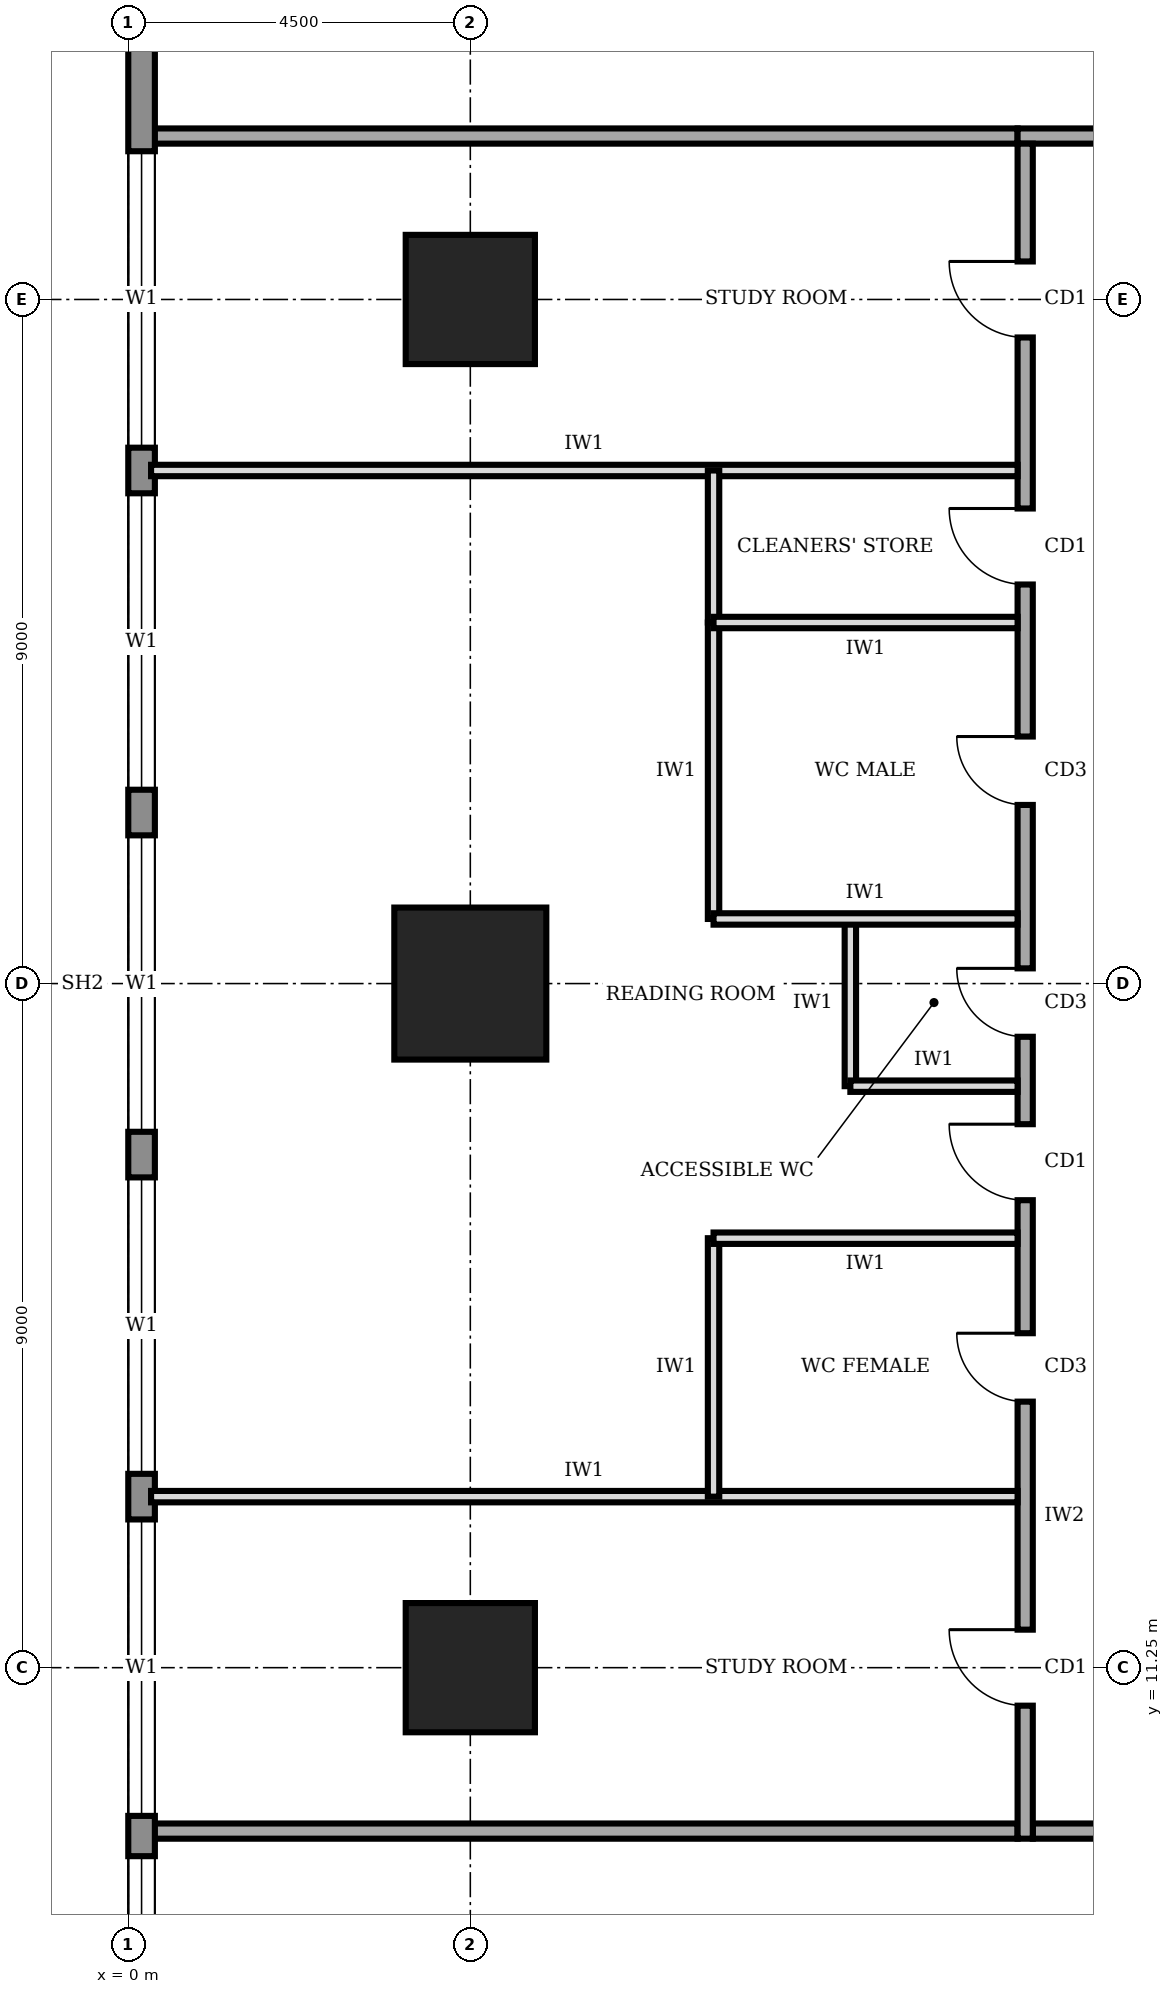
"""IFC4 building model, lengths in metres.
Left out: names, types, materials, properties, quantities, classifications, styles, units other than length and angle.
Written with IfcOpenShell. Run it as: python <this file> out.ifc"""

import sys

from ifc_helpers import new_model, si_unit, direction, frame, frame_2d, origin, origin_2d, place, context, subcontext, project, spatial, rectangle, extrude, element, fill, save


model = new_model("IFC4")
c1 = context("Model", 3, precision=1e-05, world=origin(), true_north=direction((0.0, 1.0)))
c2 = subcontext(c1, "Body", "Model", "MODEL_VIEW")
j1 = project(units=[si_unit("LENGTHUNIT", "METRE"), si_unit("PLANEANGLEUNIT", "RADIAN")], contexts=[c1])
p1 = place(None, origin())
s1 = spatial("IfcSite", under=j1, at=p1, CompositionType="ELEMENT")
p2 = place(p1, origin())
s2 = spatial("IfcBuilding", under=s1, at=p2, CompositionType="ELEMENT")
p3 = place(p2, frame((0.0, 0.0, 285.0)))
s3 = spatial("IfcBuildingStorey", under=s2, at=p3, CompositionType="ELEMENT", Elevation=285.0)
p4 = place(p3, frame((4.5, 11.25, 0.0), z_axis=(0.0, 0.0, 1.0), x_axis=(1.0, 0.0, 0.0)))
e1 = element("IfcColumn", 1, at=p4, inside=s3, PredefinedType="COLUMN", context=c2, shape_type="SweptSolid", body=[
    extrude(rectangle(XDim=1.7, YDim=1.7, at=origin_2d()), origin(), (0.0, 0.0, 1.0), 4.0),
])
p5 = place(p3, frame((4.5, 20.25, 0.0), z_axis=(0.0, 0.0, 1.0), x_axis=(1.0, 0.0, 0.0)))
e2 = element("IfcColumn", 2, at=p5, inside=s3, PredefinedType="COLUMN", context=c2, shape_type="SweptSolid", body=[
    extrude(rectangle(XDim=2.0, YDim=2.0, at=origin_2d()), origin(), (0.0, 0.0, 1.0), 4.0),
])
p6 = place(p3, frame((4.5, 29.25, 0.0), z_axis=(0.0, 0.0, 1.0), x_axis=(1.0, 0.0, 0.0)))
e3 = element("IfcColumn", 3, at=p6, inside=s3, PredefinedType="COLUMN", context=c2, shape_type="SweptSolid", body=[
    extrude(rectangle(XDim=1.7, YDim=1.7, at=origin_2d()), origin(), (0.0, 0.0, 1.0), 4.0),
])
p7 = place(p3, frame((0.175, 35.98, 0.0), z_axis=(0.0, 0.0, 1.0), x_axis=(0.0, -1.0, 0.0)))
e4 = element("IfcWall", 4, at=p7, inside=s3, PredefinedType="STANDARD", context=c2, shape_type="SweptSolid", body=[
    extrude(rectangle(XDim=31.46, YDim=0.35, at=frame_2d((15.73, 0.0))), origin(), (0.0, 0.0, 1.0), 3.75),
])
p8 = place(p7, frame((27.21, 0.0, 0.9)))
e5 = element("IfcOpeningElement", 5, at=p8, cuts=e4, PredefinedType="OPENING", context=c2, shape_type="SweptSolid", body=[
    extrude(rectangle(XDim=3.9, YDim=2.2, at=frame_2d((1.95, 1.1))), frame((0.0, 0.185, 0.0), z_axis=(0.0, -1.0, 0.0), x_axis=(1.0, 0.0, 0.0)), (0.0, 0.0, 1.0), 0.37),
])
p9 = place(p7, frame((22.78, 0.0, 0.9)))
e6 = element("IfcOpeningElement", 6, at=p9, cuts=e4, PredefinedType="OPENING", context=c2, shape_type="SweptSolid", body=[
    extrude(rectangle(XDim=3.9, YDim=2.2, at=frame_2d((1.95, 1.1))), frame((0.0, 0.185, 0.0), z_axis=(0.0, -1.0, 0.0), x_axis=(1.0, 0.0, 0.0)), (0.0, 0.0, 1.0), 0.37),
])
p10 = place(p7, frame((18.28, 0.0, 0.9)))
e7 = element("IfcOpeningElement", 7, at=p10, cuts=e4, PredefinedType="OPENING", context=c2, shape_type="SweptSolid", body=[
    extrude(rectangle(XDim=3.9, YDim=2.2, at=frame_2d((1.95, 1.1))), frame((0.0, 0.185, 0.0), z_axis=(0.0, -1.0, 0.0), x_axis=(1.0, 0.0, 0.0)), (0.0, 0.0, 1.0), 0.37),
])
p11 = place(p7, frame((13.78, 0.0, 0.9)))
e8 = element("IfcOpeningElement", 8, at=p11, cuts=e4, PredefinedType="OPENING", context=c2, shape_type="SweptSolid", body=[
    extrude(rectangle(XDim=3.9, YDim=2.2, at=frame_2d((1.95, 1.1))), frame((0.0, 0.185, 0.0), z_axis=(0.0, -1.0, 0.0), x_axis=(1.0, 0.0, 0.0)), (0.0, 0.0, 1.0), 0.37),
])
p12 = place(p7, frame((9.28, 0.0, 0.9)))
e9 = element("IfcOpeningElement", 9, at=p12, cuts=e4, PredefinedType="OPENING", context=c2, shape_type="SweptSolid", body=[
    extrude(rectangle(XDim=3.9, YDim=2.2, at=frame_2d((1.95, 1.1))), frame((0.0, 0.185, 0.0), z_axis=(0.0, -1.0, 0.0), x_axis=(1.0, 0.0, 0.0)), (0.0, 0.0, 1.0), 0.37),
])
p13 = place(p7, frame((4.78, 0.0, 0.9)))
e10 = element("IfcOpeningElement", 10, at=p13, cuts=e4, PredefinedType="OPENING", context=c2, shape_type="SweptSolid", body=[
    extrude(rectangle(XDim=3.9, YDim=2.2, at=frame_2d((1.95, 1.1))), frame((0.0, 0.185, 0.0), z_axis=(0.0, -1.0, 0.0), x_axis=(1.0, 0.0, 0.0)), (0.0, 0.0, 1.0), 0.37),
])
p14 = place(p3, frame((11.9, 9.1, 0.0), z_axis=(0.0, 0.0, 1.0), x_axis=(1.0, 0.0, 0.0)))
e11 = element("IfcWall", 11, at=p14, inside=s3, PredefinedType="SOLIDWALL", context=c2, shape_type="SweptSolid", body=[
    extrude(rectangle(XDim=18.4, YDim=0.2, at=frame_2d((9.2, 0.0))), origin(), (0.0, 0.0, 1.0), 3.75),
])
p15 = place(p14, frame((6.55, 0.0, 0.0)))
e12 = element("IfcOpeningElement", 12, at=p15, cuts=e11, PredefinedType="OPENING", context=c2, shape_type="SweptSolid", body=[
    extrude(rectangle(XDim=1.8, YDim=2.1, at=frame_2d((0.9, 1.05))), frame((0.0, 0.11, 0.0), z_axis=(0.0, -1.0, 0.0), x_axis=(1.0, 0.0, 0.0)), (0.0, 0.0, 1.0), 0.22),
])
p16 = place(p14, frame((15.85, 0.0, 0.0)))
e13 = element("IfcOpeningElement", 13, at=p16, cuts=e11, PredefinedType="OPENING", context=c2, shape_type="SweptSolid", body=[
    extrude(rectangle(XDim=1.8, YDim=2.1, at=frame_2d((0.9, 1.05))), frame((0.0, 0.11, 0.0), z_axis=(0.0, -1.0, 0.0), x_axis=(1.0, 0.0, 0.0)), (0.0, 0.0, 1.0), 0.22),
])
p17 = place(p3, frame((30.1, 31.4, 0.0), z_axis=(0.0, 0.0, 1.0), x_axis=(-1.0, 0.0, 0.0)))
e14 = element("IfcWall", 14, at=p17, inside=s3, PredefinedType="SOLIDWALL", context=c2, shape_type="SweptSolid", body=[
    extrude(rectangle(XDim=18.4, YDim=0.2, at=frame_2d((9.2, 0.0))), origin(), (0.0, 0.0, 1.0), 3.75),
])
p18 = place(p17, frame((14.35, 0.0, 0.0)))
e15 = element("IfcOpeningElement", 15, at=p18, cuts=e14, PredefinedType="OPENING", context=c2, shape_type="SweptSolid", body=[
    extrude(rectangle(XDim=1.8, YDim=2.1, at=frame_2d((0.9, 1.05))), frame((0.0, 0.11, 0.0), z_axis=(0.0, -1.0, 0.0), x_axis=(1.0, 0.0, 0.0)), (0.0, 0.0, 1.0), 0.22),
])
p19 = place(p17, frame((9.35, 0.0, 0.0)))
e16 = element("IfcOpeningElement", 16, at=p19, cuts=e14, PredefinedType="OPENING", context=c2, shape_type="SweptSolid", body=[
    extrude(rectangle(XDim=1.0, YDim=2.1, at=frame_2d((0.5, 1.05))), frame((0.0, 0.11, 0.0), z_axis=(0.0, -1.0, 0.0), x_axis=(1.0, 0.0, 0.0)), (0.0, 0.0, 1.0), 0.22),
])
p20 = place(p17, frame((2.8, 0.0, 0.0)))
e17 = element("IfcOpeningElement", 17, at=p20, cuts=e14, PredefinedType="OPENING", context=c2, shape_type="SweptSolid", body=[
    extrude(rectangle(XDim=1.8, YDim=2.1, at=frame_2d((0.9, 1.05))), frame((0.0, 0.11, 0.0), z_axis=(0.0, -1.0, 0.0), x_axis=(1.0, 0.0, 0.0)), (0.0, 0.0, 1.0), 0.22),
])
p21 = place(p3, frame((11.8, 31.3, 0.0), z_axis=(0.0, 0.0, 1.0), x_axis=(0.0, -1.0, 0.0)))
e18 = element("IfcWall", 18, at=p21, inside=s3, PredefinedType="SOLIDWALL", context=c2, shape_type="SweptSolid", body=[
    extrude(rectangle(XDim=22.3, YDim=0.2, at=frame_2d((11.15, 0.0))), origin(), (0.0, 0.0, 1.0), 3.75),
])
p22 = place(p21, frame((19.55, 0.0, 0.0)))
e19 = element("IfcOpeningElement", 19, at=p22, cuts=e18, PredefinedType="OPENING", context=c2, shape_type="SweptSolid", body=[
    extrude(rectangle(XDim=1.0, YDim=2.1, at=frame_2d((0.5, 1.05))), frame((0.0, 0.11, 0.0), z_axis=(0.0, -1.0, 0.0), x_axis=(1.0, 0.0, 0.0)), (0.0, 0.0, 1.0), 0.22),
])
p23 = place(p21, frame((15.65, 0.0, 0.0)))
e20 = element("IfcOpeningElement", 20, at=p23, cuts=e18, PredefinedType="OPENING", context=c2, shape_type="SweptSolid", body=[
    extrude(rectangle(XDim=0.9, YDim=2.1, at=frame_2d((0.45, 1.05))), frame((0.0, 0.11, 0.0), z_axis=(0.0, -1.0, 0.0), x_axis=(1.0, 0.0, 0.0)), (0.0, 0.0, 1.0), 0.22),
])
p24 = place(p21, frame((10.85, 0.0, 0.0)))
e21 = element("IfcOpeningElement", 21, at=p24, cuts=e18, PredefinedType="OPENING", context=c2, shape_type="SweptSolid", body=[
    extrude(rectangle(XDim=0.9, YDim=2.1, at=frame_2d((0.45, 1.05))), frame((0.0, 0.11, 0.0), z_axis=(0.0, -1.0, 0.0), x_axis=(1.0, 0.0, 0.0)), (0.0, 0.0, 1.0), 0.22),
])
p25 = place(p21, frame((7.8, 0.0, 0.0)))
e22 = element("IfcOpeningElement", 22, at=p25, cuts=e18, PredefinedType="OPENING", context=c2, shape_type="SweptSolid", body=[
    extrude(rectangle(XDim=0.9, YDim=2.1, at=frame_2d((0.45, 1.05))), frame((0.0, 0.11, 0.0), z_axis=(0.0, -1.0, 0.0), x_axis=(1.0, 0.0, 0.0)), (0.0, 0.0, 1.0), 0.22),
])
p26 = place(p21, frame((4.8, 0.0, 0.0)))
e23 = element("IfcOpeningElement", 23, at=p26, cuts=e18, PredefinedType="OPENING", context=c2, shape_type="SweptSolid", body=[
    extrude(rectangle(XDim=1.0, YDim=2.1, at=frame_2d((0.5, 1.05))), frame((0.0, 0.11, 0.0), z_axis=(0.0, -1.0, 0.0), x_axis=(1.0, 0.0, 0.0)), (0.0, 0.0, 1.0), 0.22),
])
p27 = place(p21, frame((12.9, 0.0, 0.0)))
e24 = element("IfcOpeningElement", 24, at=p27, cuts=e18, PredefinedType="OPENING", context=c2, shape_type="SweptSolid", body=[
    extrude(rectangle(XDim=1.0, YDim=2.1, at=frame_2d((0.5, 1.05))), frame((0.0, 0.11, 0.0), z_axis=(0.0, -1.0, 0.0), x_axis=(1.0, 0.0, 0.0)), (0.0, 0.0, 1.0), 0.22),
])
p28 = place(p21, frame((1.55, 0.0, 0.0)))
e25 = element("IfcOpeningElement", 25, at=p28, cuts=e18, PredefinedType="OPENING", context=c2, shape_type="SweptSolid", body=[
    extrude(rectangle(XDim=1.0, YDim=2.1, at=frame_2d((0.5, 1.05))), frame((0.0, 0.11, 0.0), z_axis=(0.0, -1.0, 0.0), x_axis=(1.0, 0.0, 0.0)), (0.0, 0.0, 1.0), 0.22),
])
for number, where, z_axis, x_axis in (
    (26, (0.3, 9.1, 0.0), (0.0, 0.0, 1.0), (1.0, 0.0, 0.0)),
    (27, (0.3, 31.4, 0.0), (0.0, 0.0, 1.0), (1.0, 0.0, 0.0)),
):
    element("IfcWall", number, at=place(p3, frame(where, z_axis=z_axis, x_axis=x_axis)), inside=s3, PredefinedType="SOLIDWALL", context=c2, shape_type="SweptSolid", body=[
        extrude(rectangle(XDim=11.4, YDim=0.2, at=frame_2d((5.7, 0.0))), origin(), (0.0, 0.0, 1.0), 3.75),
    ])
for number, where, z_axis, x_axis in (
    (28, (0.3, 13.5, 0.0), (0.0, 0.0, 1.0), (1.0, 0.0, 0.0)),
    (29, (0.3, 27.0, 0.0), (0.0, 0.0, 1.0), (1.0, 0.0, 0.0)),
):
    element("IfcWall", number, at=place(p3, frame(where, z_axis=z_axis, x_axis=x_axis)), inside=s3, PredefinedType="PARTITIONING", context=c2, shape_type="SweptSolid", body=[
        extrude(rectangle(XDim=11.4, YDim=0.15, at=frame_2d((5.7, 0.0))), origin(), (0.0, 0.0, 1.0), 3.75),
    ])
p29 = place(p3, frame((11.7, 16.9, 0.0), z_axis=(0.0, 0.0, 1.0), x_axis=(-1.0, 0.0, 0.0)))
e30 = element("IfcWall", 30, at=p29, inside=s3, PredefinedType="PARTITIONING", context=c2, shape_type="SweptSolid", body=[
    extrude(rectangle(XDim=4.0, YDim=0.15, at=frame_2d((2.0, 0.0))), origin(), (0.0, 0.0, 1.0), 3.75),
])
p30 = place(p3, frame((11.7, 18.9, 0.0), z_axis=(0.0, 0.0, 1.0), x_axis=(-1.0, 0.0, 0.0)))
e31 = element("IfcWall", 31, at=p30, inside=s3, PredefinedType="PARTITIONING", context=c2, shape_type="SweptSolid", body=[
    extrude(rectangle(XDim=2.2, YDim=0.15, at=frame_2d((1.1, 0.0))), origin(), (0.0, 0.0, 1.0), 3.75),
])
p31 = place(p3, frame((11.7, 21.1, 0.0), z_axis=(0.0, 0.0, 1.0), x_axis=(-1.0, 0.0, 0.0)))
e32 = element("IfcWall", 32, at=p31, inside=s3, PredefinedType="PARTITIONING", context=c2, shape_type="SweptSolid", body=[
    extrude(rectangle(XDim=4.0, YDim=0.15, at=frame_2d((2.0, 0.0))), origin(), (0.0, 0.0, 1.0), 2.85),
])
p32 = place(p3, frame((11.7, 25.0, 0.0), z_axis=(0.0, 0.0, 1.0), x_axis=(-1.0, 0.0, 0.0)))
e33 = element("IfcWall", 33, at=p32, inside=s3, PredefinedType="PARTITIONING", context=c2, shape_type="SweptSolid", body=[
    extrude(rectangle(XDim=4.0, YDim=0.15, at=frame_2d((2.0, 0.0))), origin(), (0.0, 0.0, 1.0), 3.75),
])
p33 = place(p3, frame((7.7, 13.5, 0.0), z_axis=(0.0, 0.0, 1.0), x_axis=(0.0, 1.0, 0.0)))
e34 = element("IfcWall", 34, at=p33, inside=s3, PredefinedType="PARTITIONING", context=c2, shape_type="SweptSolid", body=[
    extrude(rectangle(XDim=3.4, YDim=0.15, at=frame_2d((1.7, 0.0))), origin(), (0.0, 0.0, 1.0), 3.75),
])
p34 = place(p3, frame((9.5, 18.9, 0.0), z_axis=(0.0, 0.0, 1.0), x_axis=(0.0, 1.0, 0.0)))
e35 = element("IfcWall", 35, at=p34, inside=s3, PredefinedType="PARTITIONING", context=c2, shape_type="SweptSolid", body=[
    extrude(rectangle(XDim=2.2, YDim=0.15, at=frame_2d((1.1, 0.0))), origin(), (0.0, 0.0, 1.0), 3.75),
])
p35 = place(p3, frame((7.7, 21.1, 0.0), z_axis=(0.0, 0.0, 1.0), x_axis=(0.0, 1.0, 0.0)))
e36 = element("IfcWall", 36, at=p35, inside=s3, PredefinedType="PARTITIONING", context=c2, shape_type="SweptSolid", body=[
    extrude(rectangle(XDim=3.9, YDim=0.15, at=frame_2d((1.95, 0.0))), origin(), (0.0, 0.0, 1.0), 3.75),
])
p36 = place(p3, frame((7.7, 25.0, 0.0), z_axis=(0.0, 0.0, 1.0), x_axis=(0.0, 1.0, 0.0)))
e37 = element("IfcWall", 37, at=p36, inside=s3, PredefinedType="PARTITIONING", context=c2, shape_type="SweptSolid", body=[
    extrude(rectangle(XDim=2.0, YDim=0.15, at=frame_2d((1.0, 0.0))), origin(), (0.0, 0.0, 1.0), 3.75),
])
p37 = place(p8, origin())
e38 = element("IfcWindow", 38, at=p37, inside=s3, PartitioningType="SINGLE_PANEL", PredefinedType="WINDOW", context=c2, shape_type="SweptSolid", body=[
    extrude(rectangle(XDim=3.9, YDim=2.2, at=frame_2d((1.95, 1.1))), frame((0.0, 0.03, 0.0), z_axis=(0.0, -1.0, 0.0), x_axis=(1.0, 0.0, 0.0)), (0.0, 0.0, 1.0), 0.06),
])
fill(e5, e38)
p38 = place(p9, origin())
e39 = element("IfcWindow", 39, at=p38, inside=s3, PartitioningType="SINGLE_PANEL", PredefinedType="WINDOW", context=c2, shape_type="SweptSolid", body=[
    extrude(rectangle(XDim=3.9, YDim=2.2, at=frame_2d((1.95, 1.1))), frame((0.0, 0.03, 0.0), z_axis=(0.0, -1.0, 0.0), x_axis=(1.0, 0.0, 0.0)), (0.0, 0.0, 1.0), 0.06),
])
fill(e6, e39)
p39 = place(p10, origin())
e40 = element("IfcWindow", 40, at=p39, inside=s3, PartitioningType="SINGLE_PANEL", PredefinedType="WINDOW", context=c2, shape_type="SweptSolid", body=[
    extrude(rectangle(XDim=3.9, YDim=2.2, at=frame_2d((1.95, 1.1))), frame((0.0, 0.03, 0.0), z_axis=(0.0, -1.0, 0.0), x_axis=(1.0, 0.0, 0.0)), (0.0, 0.0, 1.0), 0.06),
])
fill(e7, e40)
p40 = place(p11, origin())
e41 = element("IfcWindow", 41, at=p40, inside=s3, PartitioningType="SINGLE_PANEL", PredefinedType="WINDOW", context=c2, shape_type="SweptSolid", body=[
    extrude(rectangle(XDim=3.9, YDim=2.2, at=frame_2d((1.95, 1.1))), frame((0.0, 0.03, 0.0), z_axis=(0.0, -1.0, 0.0), x_axis=(1.0, 0.0, 0.0)), (0.0, 0.0, 1.0), 0.06),
])
fill(e8, e41)
p41 = place(p12, origin())
e42 = element("IfcWindow", 42, at=p41, inside=s3, PartitioningType="SINGLE_PANEL", PredefinedType="WINDOW", context=c2, shape_type="SweptSolid", body=[
    extrude(rectangle(XDim=3.9, YDim=2.2, at=frame_2d((1.95, 1.1))), frame((0.0, 0.03, 0.0), z_axis=(0.0, -1.0, 0.0), x_axis=(1.0, 0.0, 0.0)), (0.0, 0.0, 1.0), 0.06),
])
fill(e9, e42)
p42 = place(p13, origin())
e43 = element("IfcWindow", 43, at=p42, inside=s3, PartitioningType="SINGLE_PANEL", PredefinedType="WINDOW", context=c2, shape_type="SweptSolid", body=[
    extrude(rectangle(XDim=3.9, YDim=2.2, at=frame_2d((1.95, 1.1))), frame((0.0, 0.03, 0.0), z_axis=(0.0, -1.0, 0.0), x_axis=(1.0, 0.0, 0.0)), (0.0, 0.0, 1.0), 0.06),
])
fill(e10, e43)
p43 = place(p22, frame((1.0, 0.0, 0.0), z_axis=(0.0, 0.0, 1.0), x_axis=(-1.0, 0.0, 0.0)))
e44 = element("IfcDoor", 44, at=p43, inside=s3, OperationType="SINGLE_SWING_RIGHT", PredefinedType="DOOR", context=c2, shape_type="SweptSolid", body=[
    extrude(rectangle(XDim=1.0, YDim=2.1, at=frame_2d((0.5, 1.05))), frame((0.0, 0.025, 0.0), z_axis=(0.0, -1.0, 0.0), x_axis=(1.0, 0.0, 0.0)), (0.0, 0.0, 1.0), 0.05),
])
fill(e19, e44)
p44 = place(p23, frame((0.9, 0.0, 0.0), z_axis=(0.0, 0.0, 1.0), x_axis=(-1.0, 0.0, 0.0)))
e45 = element("IfcDoor", 45, at=p44, inside=s3, OperationType="SINGLE_SWING_RIGHT", PredefinedType="DOOR", context=c2, shape_type="SweptSolid", body=[
    extrude(rectangle(XDim=0.9, YDim=2.1, at=frame_2d((0.45, 1.05))), frame((0.0, 0.025, 0.0), z_axis=(0.0, -1.0, 0.0), x_axis=(1.0, 0.0, 0.0)), (0.0, 0.0, 1.0), 0.05),
])
fill(e20, e45)
p45 = place(p24, frame((0.9, 0.0, 0.0), z_axis=(0.0, 0.0, 1.0), x_axis=(-1.0, 0.0, 0.0)))
e46 = element("IfcDoor", 46, at=p45, inside=s3, OperationType="SINGLE_SWING_RIGHT", PredefinedType="DOOR", context=c2, shape_type="SweptSolid", body=[
    extrude(rectangle(XDim=0.9, YDim=2.1, at=frame_2d((0.45, 1.05))), frame((0.0, 0.025, 0.0), z_axis=(0.0, -1.0, 0.0), x_axis=(1.0, 0.0, 0.0)), (0.0, 0.0, 1.0), 0.05),
])
fill(e21, e46)
p46 = place(p25, frame((0.9, 0.0, 0.0), z_axis=(0.0, 0.0, 1.0), x_axis=(-1.0, 0.0, 0.0)))
e47 = element("IfcDoor", 47, at=p46, inside=s3, OperationType="SINGLE_SWING_RIGHT", PredefinedType="DOOR", context=c2, shape_type="SweptSolid", body=[
    extrude(rectangle(XDim=0.9, YDim=2.1, at=frame_2d((0.45, 1.05))), frame((0.0, 0.025, 0.0), z_axis=(0.0, -1.0, 0.0), x_axis=(1.0, 0.0, 0.0)), (0.0, 0.0, 1.0), 0.05),
])
fill(e22, e47)
p47 = place(p26, frame((1.0, 0.0, 0.0), z_axis=(0.0, 0.0, 1.0), x_axis=(-1.0, 0.0, 0.0)))
e48 = element("IfcDoor", 48, at=p47, inside=s3, OperationType="SINGLE_SWING_RIGHT", PredefinedType="DOOR", context=c2, shape_type="SweptSolid", body=[
    extrude(rectangle(XDim=1.0, YDim=2.1, at=frame_2d((0.5, 1.05))), frame((0.0, 0.025, 0.0), z_axis=(0.0, -1.0, 0.0), x_axis=(1.0, 0.0, 0.0)), (0.0, 0.0, 1.0), 0.05),
])
fill(e23, e48)
p48 = place(p27, frame((1.0, 0.0, 0.0), z_axis=(0.0, 0.0, 1.0), x_axis=(-1.0, 0.0, 0.0)))
e49 = element("IfcDoor", 49, at=p48, inside=s3, OperationType="SINGLE_SWING_RIGHT", PredefinedType="DOOR", context=c2, shape_type="SweptSolid", body=[
    extrude(rectangle(XDim=1.0, YDim=2.1, at=frame_2d((0.5, 1.05))), frame((0.0, 0.025, 0.0), z_axis=(0.0, -1.0, 0.0), x_axis=(1.0, 0.0, 0.0)), (0.0, 0.0, 1.0), 0.05),
])
fill(e24, e49)
p49 = place(p28, frame((1.0, 0.0, 0.0), z_axis=(0.0, 0.0, 1.0), x_axis=(-1.0, 0.0, 0.0)))
e50 = element("IfcDoor", 50, at=p49, inside=s3, OperationType="SINGLE_SWING_RIGHT", PredefinedType="DOOR", context=c2, shape_type="SweptSolid", body=[
    extrude(rectangle(XDim=1.0, YDim=2.1, at=frame_2d((0.5, 1.05))), frame((0.0, 0.025, 0.0), z_axis=(0.0, -1.0, 0.0), x_axis=(1.0, 0.0, 0.0)), (0.0, 0.0, 1.0), 0.05),
])
fill(e25, e50)
save(model, sys.argv[1])
